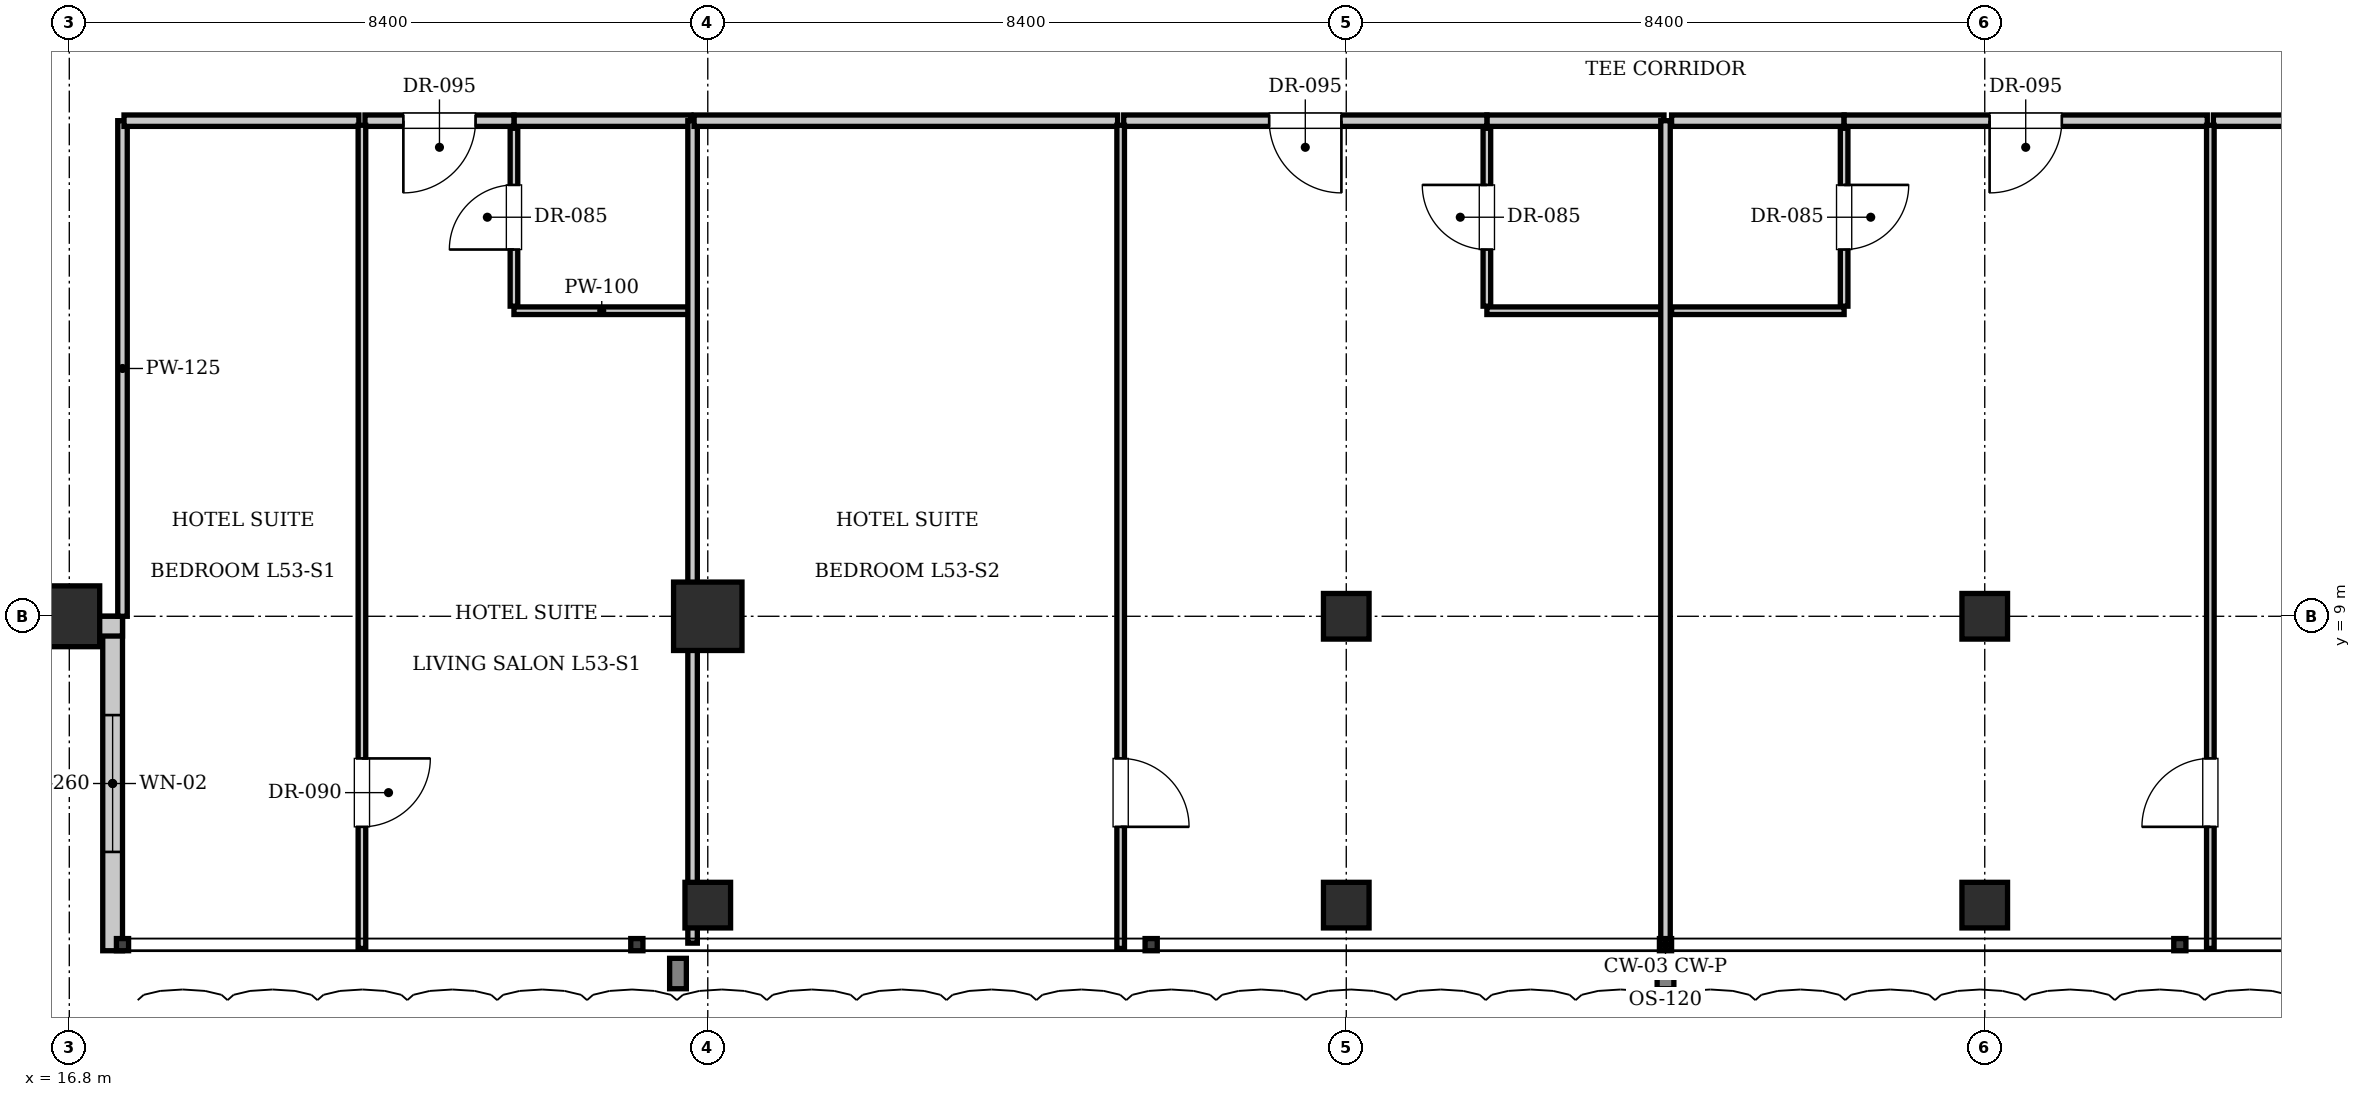
"""IFC4 building model, lengths in metres.
Left out: names, types, materials, properties, quantities, classifications, styles, units other than length and angle.
Written with IfcOpenShell. Run it as: python <this file> out.ifc"""

import sys

from ifc_helpers import new_model, si_unit, direction, frame, frame_2d, origin, origin_2d, place, context, subcontext, project, spatial, rectangle, i_section, extrude, element, fill, save


model = new_model("IFC4")
c1 = context("Model", 3, precision=1e-05, world=origin(), true_north=direction((0.0, 1.0)))
c2 = subcontext(c1, "Body", "Model", "MODEL_VIEW")
j1 = project(units=[si_unit("LENGTHUNIT", "METRE"), si_unit("PLANEANGLEUNIT", "RADIAN")], contexts=[c1])
p1 = place(None, origin())
s1 = spatial("IfcSite", under=j1, at=p1, CompositionType="ELEMENT")
p2 = place(p1, origin())
s2 = spatial("IfcBuilding", under=s1, at=p2, CompositionType="ELEMENT")
p3 = place(p2, frame((0.0, 0.0, 215.95)))
s3 = spatial("IfcBuildingStorey", under=s2, at=p3, CompositionType="ELEMENT", Elevation=215.95)
p4 = place(p3, frame((25.2, 9.0, 0.0), z_axis=(0.0, 0.0, 1.0), x_axis=(1.0, 0.0, 0.0)))
e1 = element("IfcColumn", 1, at=p4, inside=s3, PredefinedType="COLUMN", context=c2, shape_type="SweptSolid", body=[
    extrude(rectangle(XDim=0.9, YDim=0.9, at=origin_2d()), origin(), (0.0, 0.0, 1.0), 3.85),
])
for number, where, z_axis, x_axis in (
    (2, (33.6, 9.0, 0.0), (0.0, 0.0, 1.0), (1.0, 0.0, 0.0)),
    (3, (42.0, 9.0, 0.0), (0.0, 0.0, 1.0), (1.0, 0.0, 0.0)),
):
    element("IfcColumn", number, at=place(p3, frame(where, z_axis=z_axis, x_axis=x_axis)), inside=s3, PredefinedType="COLUMN", context=c2, shape_type="SweptSolid", body=[
        extrude(i_section(OverallWidth=0.6, OverallDepth=0.6, WebThickness=0.025, FlangeThickness=0.038, at=origin_2d()), origin(), (0.0, 0.0, 1.0), 3.85),
    ])
p5 = place(p3, frame((16.8, 9.0, 0.0), z_axis=(0.0, 0.0, 1.0), x_axis=(1.0, 0.0, 0.0)))
e4 = element("IfcColumn", 4, at=p5, inside=s3, PredefinedType="COLUMN", context=c2, shape_type="SweptSolid", body=[
    extrude(rectangle(XDim=0.8, YDim=0.8, at=origin_2d()), origin(), (0.0, 0.0, 1.0), 3.85),
])
for number, where, z_axis, x_axis in (
    (5, (25.2, 5.2, 0.0), (0.0, 0.0, 1.0), (1.0, 0.0, 0.0)),
    (6, (33.6, 5.2, 0.0), (0.0, 0.0, 1.0), (1.0, 0.0, 0.0)),
    (7, (42.0, 5.2, 0.0), (0.0, 0.0, 1.0), (1.0, 0.0, 0.0)),
):
    element("IfcColumn", number, at=place(p3, frame(where, z_axis=z_axis, x_axis=x_axis)), inside=s3, PredefinedType="COLUMN", context=c2, shape_type="SweptSolid", body=[
        extrude(i_section(OverallWidth=0.6, OverallDepth=0.6, WebThickness=0.025, FlangeThickness=0.038, at=origin_2d()), origin(), (0.0, 0.0, 1.0), 3.85),
    ])
p6 = place(p3, frame((17.37, 4.6, 0.0), z_axis=(0.0, 0.0, 1.0), x_axis=(0.0, 1.0, 0.0)))
e8 = element("IfcWall", 8, at=p6, inside=s3, PredefinedType="SOLIDWALL", context=c2, shape_type="SweptSolid", body=[
    extrude(rectangle(XDim=4.4, YDim=0.26, at=frame_2d((2.2, 0.0))), origin(), (0.0, 0.0, 1.0), 3.61),
])
p7 = place(p6, frame((1.3, 0.0, 0.9)))
e9 = element("IfcOpeningElement", 9, at=p7, cuts=e8, PredefinedType="OPENING", context=c2, shape_type="SweptSolid", body=[
    extrude(rectangle(XDim=1.8, YDim=2.1, at=frame_2d((0.9, 1.05))), frame((0.0, 0.14, 0.0), z_axis=(0.0, -1.0, 0.0), x_axis=(1.0, 0.0, 0.0)), (0.0, 0.0, 1.0), 0.28),
])
p8 = place(p3, frame((17.5, 8.87, 0.0), z_axis=(0.0, 0.0, 1.0), x_axis=(-1.0, 0.0, 0.0)))
e10 = element("IfcWall", 10, at=p8, inside=s3, PredefinedType="SOLIDWALL", context=c2, shape_type="SweptSolid", body=[
    extrude(rectangle(XDim=4.4, YDim=0.26, at=frame_2d((2.2, 0.0))), origin(), (0.0, 0.0, 1.0), 3.071),
])
p9 = place(p8, frame((1.3, 0.0, 0.9)))
e11 = element("IfcOpeningElement", 11, at=p9, cuts=e10, PredefinedType="OPENING", context=c2, shape_type="SweptSolid", body=[
    extrude(rectangle(XDim=1.8, YDim=2.1, at=frame_2d((0.9, 1.05))), frame((0.0, 0.14, 0.0), z_axis=(0.0, -1.0, 0.0), x_axis=(1.0, 0.0, 0.0)), (0.0, 0.0, 1.0), 0.28),
])
p10 = place(p3, frame((17.5, 9.0, 0.0), z_axis=(0.0, 0.0, 1.0), x_axis=(0.0, 1.0, 0.0)))
e12 = element("IfcWall", 12, at=p10, inside=s3, PredefinedType="PARTITIONING", context=c2, shape_type="SweptSolid", body=[
    extrude(rectangle(XDim=6.52, YDim=0.125, at=frame_2d((3.26, 0.0))), origin(), (0.0, 0.0, 1.0), 3.61),
])
p11 = place(p3, frame((22.65, 15.52, 0.0), z_axis=(0.0, 0.0, 1.0), x_axis=(1.0, 0.0, 0.0)))
e13 = element("IfcWall", 13, at=p11, inside=s3, PredefinedType="PARTITIONING", context=c2, shape_type="SweptSolid", body=[
    extrude(rectangle(XDim=2.33, YDim=0.15, at=frame_2d((1.165, 0.0))), origin(), (0.0, 0.0, 1.0), 3.61),
])
p12 = place(p3, frame((22.65, 13.02, 0.0), z_axis=(0.0, 0.0, 1.0), x_axis=(1.0, 0.0, 0.0)))
e14 = element("IfcWall", 14, at=p12, inside=s3, PredefinedType="PARTITIONING", context=c2, shape_type="SweptSolid", body=[
    extrude(rectangle(XDim=2.31, YDim=0.1, at=frame_2d((1.155, 0.0))), origin(), (0.0, 0.0, 1.0), 3.61),
])
p13 = place(p3, frame((22.65, 13.08, 0.0), z_axis=(0.0, 0.0, 1.0), x_axis=(0.0, 1.0, 0.0)))
e15 = element("IfcWall", 15, at=p13, inside=s3, PredefinedType="PARTITIONING", context=c2, shape_type="SweptSolid", body=[
    extrude(rectangle(XDim=2.34, YDim=0.1, at=frame_2d((1.17, 0.0))), origin(), (0.0, 0.0, 1.0), 3.61),
])
p14 = place(p13, frame((0.745, 0.0, 0.0)))
e16 = element("IfcOpeningElement", 16, at=p14, cuts=e15, PredefinedType="OPENING", context=c2, shape_type="SweptSolid", body=[
    extrude(rectangle(XDim=0.85, YDim=2.1, at=frame_2d((0.425, 1.05))), frame((0.0, 0.06, 0.0), z_axis=(0.0, -1.0, 0.0), x_axis=(1.0, 0.0, 0.0)), (0.0, 0.0, 1.0), 0.12),
])
p15 = place(p3, frame((17.52, 15.52, 0.0), z_axis=(0.0, 0.0, 1.0), x_axis=(1.0, 0.0, 0.0)))
e17 = element("IfcWall", 17, at=p15, inside=s3, PredefinedType="PARTITIONING", context=c2, shape_type="SweptSolid", body=[
    extrude(rectangle(XDim=3.09, YDim=0.15, at=frame_2d((1.545, 0.0))), origin(), (0.0, 0.0, 1.0), 3.61),
])
p16 = place(p3, frame((20.69, 15.52, 0.0), z_axis=(0.0, 0.0, 1.0), x_axis=(1.0, 0.0, 0.0)))
e18 = element("IfcWall", 18, at=p16, inside=s3, PredefinedType="PARTITIONING", context=c2, shape_type="SweptSolid", body=[
    extrude(rectangle(XDim=1.96, YDim=0.15, at=frame_2d((0.98, 0.0))), origin(), (0.0, 0.0, 1.0), 3.61),
])
p17 = place(p16, frame((0.505, 0.0, 0.0)))
e19 = element("IfcOpeningElement", 19, at=p17, cuts=e18, PredefinedType="OPENING", context=c2, shape_type="SweptSolid", body=[
    extrude(rectangle(XDim=0.95, YDim=2.15, at=frame_2d((0.475, 1.075))), frame((0.0, 0.085, 0.0), z_axis=(0.0, -1.0, 0.0), x_axis=(1.0, 0.0, 0.0)), (0.0, 0.0, 1.0), 0.17),
])
p18 = place(p3, frame((20.65, 4.63, 0.0), z_axis=(0.0, 0.0, 1.0), x_axis=(0.0, 1.0, 0.0)))
e20 = element("IfcWall", 20, at=p18, inside=s3, PredefinedType="PARTITIONING", context=c2, shape_type="SweptSolid", body=[
    extrude(rectangle(XDim=10.83, YDim=0.1, at=frame_2d((5.415, 0.0))), origin(), (0.0, 0.0, 1.0), 3.61),
])
p19 = place(p18, frame((1.6, 0.0, 0.0)))
e21 = element("IfcOpeningElement", 21, at=p19, cuts=e20, PredefinedType="OPENING", context=c2, shape_type="SweptSolid", body=[
    extrude(rectangle(XDim=0.9, YDim=2.1, at=frame_2d((0.45, 1.05))), frame((0.0, 0.06, 0.0), z_axis=(0.0, -1.0, 0.0), x_axis=(1.0, 0.0, 0.0)), (0.0, 0.0, 1.0), 0.12),
])
p20 = place(p3, frame((25.0, 4.7, 0.0), z_axis=(0.0, 0.0, 1.0), x_axis=(0.0, 1.0, 0.0)))
e22 = element("IfcWall", 22, at=p20, inside=s3, PredefinedType="PARTITIONING", context=c2, shape_type="SweptSolid", body=[
    extrude(rectangle(XDim=10.82, YDim=0.125, at=frame_2d((5.41, 0.0))), origin(), (0.0, 0.0, 1.0), 3.61),
])
p21 = place(p3, frame((35.45, 15.52, 0.0), z_axis=(0.0, 0.0, 1.0), x_axis=(1.0, 0.0, 0.0)))
e23 = element("IfcWall", 23, at=p21, inside=s3, PredefinedType="PARTITIONING", context=c2, shape_type="SweptSolid", body=[
    extrude(rectangle(XDim=2.33, YDim=0.15, at=frame_2d((1.165, 0.0))), origin(), (0.0, 0.0, 1.0), 3.61),
])
p22 = place(p3, frame((35.45, 13.02, 0.0), z_axis=(0.0, 0.0, 1.0), x_axis=(1.0, 0.0, 0.0)))
e24 = element("IfcWall", 24, at=p22, inside=s3, PredefinedType="PARTITIONING", context=c2, shape_type="SweptSolid", body=[
    extrude(rectangle(XDim=2.31, YDim=0.1, at=frame_2d((1.155, 0.0))), origin(), (0.0, 0.0, 1.0), 3.61),
])
p23 = place(p3, frame((35.45, 13.08, 0.0), z_axis=(0.0, 0.0, 1.0), x_axis=(0.0, 1.0, 0.0)))
e25 = element("IfcWall", 25, at=p23, inside=s3, PredefinedType="PARTITIONING", context=c2, shape_type="SweptSolid", body=[
    extrude(rectangle(XDim=2.34, YDim=0.1, at=frame_2d((1.17, 0.0))), origin(), (0.0, 0.0, 1.0), 3.61),
])
p24 = place(p23, frame((0.745, 0.0, 0.0)))
e26 = element("IfcOpeningElement", 26, at=p24, cuts=e25, PredefinedType="OPENING", context=c2, shape_type="SweptSolid", body=[
    extrude(rectangle(XDim=0.85, YDim=2.1, at=frame_2d((0.425, 1.05))), frame((0.0, 0.06, 0.0), z_axis=(0.0, -1.0, 0.0), x_axis=(1.0, 0.0, 0.0)), (0.0, 0.0, 1.0), 0.12),
])
p25 = place(p3, frame((25.02, 15.52, 0.0), z_axis=(0.0, 0.0, 1.0), x_axis=(1.0, 0.0, 0.0)))
e27 = element("IfcWall", 27, at=p25, inside=s3, PredefinedType="PARTITIONING", context=c2, shape_type="SweptSolid", body=[
    extrude(rectangle(XDim=5.572, YDim=0.15, at=frame_2d((2.786, 0.0))), origin(), (0.0, 0.0, 1.0), 3.61),
])
p26 = place(p3, frame((30.672, 15.52, 0.0), z_axis=(0.0, 0.0, 1.0), x_axis=(1.0, 0.0, 0.0)))
e28 = element("IfcWall", 28, at=p26, inside=s3, PredefinedType="PARTITIONING", context=c2, shape_type="SweptSolid", body=[
    extrude(rectangle(XDim=4.778, YDim=0.15, at=frame_2d((2.389, 0.0))), origin(), (0.0, 0.0, 1.0), 3.61),
])
p27 = place(p26, frame((1.914, 0.0, 0.0)))
e29 = element("IfcOpeningElement", 29, at=p27, cuts=e28, PredefinedType="OPENING", context=c2, shape_type="SweptSolid", body=[
    extrude(rectangle(XDim=0.95, YDim=2.15, at=frame_2d((0.475, 1.075))), frame((0.0, 0.085, 0.0), z_axis=(0.0, -1.0, 0.0), x_axis=(1.0, 0.0, 0.0)), (0.0, 0.0, 1.0), 0.17),
])
p28 = place(p3, frame((30.632, 4.63, 0.0), z_axis=(0.0, 0.0, 1.0), x_axis=(0.0, 1.0, 0.0)))
e30 = element("IfcWall", 30, at=p28, inside=s3, PredefinedType="PARTITIONING", context=c2, shape_type="SweptSolid", body=[
    extrude(rectangle(XDim=10.83, YDim=0.1, at=frame_2d((5.415, 0.0))), origin(), (0.0, 0.0, 1.0), 3.61),
])
p29 = place(p28, frame((1.6, 0.0, 0.0)))
e31 = element("IfcOpeningElement", 31, at=p29, cuts=e30, PredefinedType="OPENING", context=c2, shape_type="SweptSolid", body=[
    extrude(rectangle(XDim=0.9, YDim=2.1, at=frame_2d((0.45, 1.05))), frame((0.0, 0.06, 0.0), z_axis=(0.0, -1.0, 0.0), x_axis=(1.0, 0.0, 0.0)), (0.0, 0.0, 1.0), 0.12),
])
p30 = place(p3, frame((37.8, 4.7, 0.0), z_axis=(0.0, 0.0, 1.0), x_axis=(0.0, 1.0, 0.0)))
e32 = element("IfcWall", 32, at=p30, inside=s3, PredefinedType="PARTITIONING", context=c2, shape_type="SweptSolid", body=[
    extrude(rectangle(XDim=10.82, YDim=0.125, at=frame_2d((5.41, 0.0))), origin(), (0.0, 0.0, 1.0), 3.255),
])
p31 = place(p3, frame((37.88, 15.52, 0.0), z_axis=(0.0, 0.0, 1.0), x_axis=(1.0, 0.0, 0.0)))
e33 = element("IfcWall", 33, at=p31, inside=s3, PredefinedType="PARTITIONING", context=c2, shape_type="SweptSolid", body=[
    extrude(rectangle(XDim=2.27, YDim=0.15, at=frame_2d((1.135, 0.0))), origin(), (0.0, 0.0, 1.0), 3.61),
])
p32 = place(p3, frame((37.88, 13.02, 0.0), z_axis=(0.0, 0.0, 1.0), x_axis=(1.0, 0.0, 0.0)))
e34 = element("IfcWall", 34, at=p32, inside=s3, PredefinedType="PARTITIONING", context=c2, shape_type="SweptSolid", body=[
    extrude(rectangle(XDim=2.27, YDim=0.1, at=frame_2d((1.135, 0.0))), origin(), (0.0, 0.0, 1.0), 3.61),
])
p33 = place(p3, frame((40.15, 13.08, 0.0), z_axis=(0.0, 0.0, 1.0), x_axis=(0.0, 1.0, 0.0)))
e35 = element("IfcWall", 35, at=p33, inside=s3, PredefinedType="PARTITIONING", context=c2, shape_type="SweptSolid", body=[
    extrude(rectangle(XDim=2.34, YDim=0.1, at=frame_2d((1.17, 0.0))), origin(), (0.0, 0.0, 1.0), 3.61),
])
p34 = place(p33, frame((0.745, 0.0, 0.0)))
e36 = element("IfcOpeningElement", 36, at=p34, cuts=e35, PredefinedType="OPENING", context=c2, shape_type="SweptSolid", body=[
    extrude(rectangle(XDim=0.85, YDim=2.1, at=frame_2d((0.425, 1.05))), frame((0.0, 0.06, 0.0), z_axis=(0.0, -1.0, 0.0), x_axis=(1.0, 0.0, 0.0)), (0.0, 0.0, 1.0), 0.12),
])
p35 = place(p3, frame((40.15, 15.52, 0.0), z_axis=(0.0, 0.0, 1.0), x_axis=(1.0, 0.0, 0.0)))
e37 = element("IfcWall", 37, at=p35, inside=s3, PredefinedType="PARTITIONING", context=c2, shape_type="SweptSolid", body=[
    extrude(rectangle(XDim=4.778, YDim=0.15, at=frame_2d((2.389, 0.0))), origin(), (0.0, 0.0, 1.0), 3.61),
])
p36 = place(p35, frame((1.914, 0.0, 0.0)))
e38 = element("IfcOpeningElement", 38, at=p36, cuts=e37, PredefinedType="OPENING", context=c2, shape_type="SweptSolid", body=[
    extrude(rectangle(XDim=0.95, YDim=2.15, at=frame_2d((0.475, 1.075))), frame((0.0, 0.085, 0.0), z_axis=(0.0, -1.0, 0.0), x_axis=(1.0, 0.0, 0.0)), (0.0, 0.0, 1.0), 0.17),
])
p37 = place(p3, frame((45.008, 15.52, 0.0), z_axis=(0.0, 0.0, 1.0), x_axis=(1.0, 0.0, 0.0)))
e39 = element("IfcWall", 39, at=p37, inside=s3, PredefinedType="PARTITIONING", context=c2, shape_type="SweptSolid", body=[
    extrude(rectangle(XDim=5.572, YDim=0.15, at=frame_2d((2.786, 0.0))), origin(), (0.0, 0.0, 1.0), 3.61),
])
p38 = place(p3, frame((44.968, 4.63, 0.0), z_axis=(0.0, 0.0, 1.0), x_axis=(0.0, 1.0, 0.0)))
e40 = element("IfcWall", 40, at=p38, inside=s3, PredefinedType="PARTITIONING", context=c2, shape_type="SweptSolid", body=[
    extrude(rectangle(XDim=10.83, YDim=0.1, at=frame_2d((5.415, 0.0))), origin(), (0.0, 0.0, 1.0), 3.61),
])
p39 = place(p38, frame((1.6, 0.0, 0.0)))
e41 = element("IfcOpeningElement", 41, at=p39, cuts=e40, PredefinedType="OPENING", context=c2, shape_type="SweptSolid", body=[
    extrude(rectangle(XDim=0.9, YDim=2.1, at=frame_2d((0.45, 1.05))), frame((0.0, 0.06, 0.0), z_axis=(0.0, -1.0, 0.0), x_axis=(1.0, 0.0, 0.0)), (0.0, 0.0, 1.0), 0.12),
])
p40 = place(p7, origin())
e42 = element("IfcWindow", 42, at=p40, inside=s3, PartitioningType="SINGLE_PANEL", PredefinedType="WINDOW", context=c2, shape_type="SweptSolid", body=[
    extrude(rectangle(XDim=1.8, YDim=2.1, at=frame_2d((0.9, 1.05))), frame((0.0, 0.03, 0.0), z_axis=(0.0, -1.0, 0.0), x_axis=(1.0, 0.0, 0.0)), (0.0, 0.0, 1.0), 0.06),
])
fill(e9, e42)
p41 = place(p14, origin())
e43 = element("IfcDoor", 43, at=p41, inside=s3, OperationType="SINGLE_SWING_LEFT", PredefinedType="DOOR", context=c2, shape_type="SweptSolid", body=[
    extrude(rectangle(XDim=0.85, YDim=2.1, at=frame_2d((0.425, 1.05))), frame((0.0, 0.025, 0.0), z_axis=(0.0, -1.0, 0.0), x_axis=(1.0, 0.0, 0.0)), (0.0, 0.0, 1.0), 0.05),
])
fill(e16, e43)
p42 = place(p17, frame((0.95, 0.0, 0.0), z_axis=(0.0, 0.0, 1.0), x_axis=(-1.0, 0.0, 0.0)))
e44 = element("IfcDoor", 44, at=p42, inside=s3, OperationType="SINGLE_SWING_RIGHT", PredefinedType="DOOR", context=c2, shape_type="SweptSolid", body=[
    extrude(rectangle(XDim=0.95, YDim=2.15, at=frame_2d((0.475, 1.075))), frame((0.0, 0.025, 0.0), z_axis=(0.0, -1.0, 0.0), x_axis=(1.0, 0.0, 0.0)), (0.0, 0.0, 1.0), 0.05),
])
fill(e19, e44)
p43 = place(p19, frame((0.9, 0.0, 0.0), z_axis=(0.0, 0.0, 1.0), x_axis=(-1.0, 0.0, 0.0)))
e45 = element("IfcDoor", 45, at=p43, inside=s3, OperationType="SINGLE_SWING_LEFT", PredefinedType="DOOR", context=c2, shape_type="SweptSolid", body=[
    extrude(rectangle(XDim=0.9, YDim=2.1, at=frame_2d((0.45, 1.05))), frame((0.0, 0.025, 0.0), z_axis=(0.0, -1.0, 0.0), x_axis=(1.0, 0.0, 0.0)), (0.0, 0.0, 1.0), 0.05),
])
fill(e21, e45)
p44 = place(p24, origin())
e46 = element("IfcDoor", 46, at=p44, inside=s3, OperationType="SINGLE_SWING_RIGHT", PredefinedType="DOOR", context=c2, shape_type="SweptSolid", body=[
    extrude(rectangle(XDim=0.85, YDim=2.1, at=frame_2d((0.425, 1.05))), frame((0.0, 0.025, 0.0), z_axis=(0.0, -1.0, 0.0), x_axis=(1.0, 0.0, 0.0)), (0.0, 0.0, 1.0), 0.05),
])
fill(e26, e46)
p45 = place(p27, frame((0.95, 0.0, 0.0), z_axis=(0.0, 0.0, 1.0), x_axis=(-1.0, 0.0, 0.0)))
e47 = element("IfcDoor", 47, at=p45, inside=s3, OperationType="SINGLE_SWING_LEFT", PredefinedType="DOOR", context=c2, shape_type="SweptSolid", body=[
    extrude(rectangle(XDim=0.95, YDim=2.15, at=frame_2d((0.475, 1.075))), frame((0.0, 0.025, 0.0), z_axis=(0.0, -1.0, 0.0), x_axis=(1.0, 0.0, 0.0)), (0.0, 0.0, 1.0), 0.05),
])
fill(e29, e47)
p46 = place(p29, frame((0.9, 0.0, 0.0), z_axis=(0.0, 0.0, 1.0), x_axis=(-1.0, 0.0, 0.0)))
e48 = element("IfcDoor", 48, at=p46, inside=s3, OperationType="SINGLE_SWING_RIGHT", PredefinedType="DOOR", context=c2, shape_type="SweptSolid", body=[
    extrude(rectangle(XDim=0.9, YDim=2.1, at=frame_2d((0.45, 1.05))), frame((0.0, 0.025, 0.0), z_axis=(0.0, -1.0, 0.0), x_axis=(1.0, 0.0, 0.0)), (0.0, 0.0, 1.0), 0.05),
])
fill(e31, e48)
p47 = place(p34, frame((0.85, 0.0, 0.0), z_axis=(0.0, 0.0, 1.0), x_axis=(-1.0, 0.0, 0.0)))
e49 = element("IfcDoor", 49, at=p47, inside=s3, OperationType="SINGLE_SWING_LEFT", PredefinedType="DOOR", context=c2, shape_type="SweptSolid", body=[
    extrude(rectangle(XDim=0.85, YDim=2.1, at=frame_2d((0.425, 1.05))), frame((0.0, 0.025, 0.0), z_axis=(0.0, -1.0, 0.0), x_axis=(1.0, 0.0, 0.0)), (0.0, 0.0, 1.0), 0.05),
])
fill(e36, e49)
p48 = place(p36, frame((0.95, 0.0, 0.0), z_axis=(0.0, 0.0, 1.0), x_axis=(-1.0, 0.0, 0.0)))
e50 = element("IfcDoor", 50, at=p48, inside=s3, OperationType="SINGLE_SWING_RIGHT", PredefinedType="DOOR", context=c2, shape_type="SweptSolid", body=[
    extrude(rectangle(XDim=0.95, YDim=2.15, at=frame_2d((0.475, 1.075))), frame((0.0, 0.025, 0.0), z_axis=(0.0, -1.0, 0.0), x_axis=(1.0, 0.0, 0.0)), (0.0, 0.0, 1.0), 0.05),
])
fill(e38, e50)
p49 = place(p39, origin())
e51 = element("IfcDoor", 51, at=p49, inside=s3, OperationType="SINGLE_SWING_LEFT", PredefinedType="DOOR", context=c2, shape_type="SweptSolid", body=[
    extrude(rectangle(XDim=0.9, YDim=2.1, at=frame_2d((0.45, 1.05))), frame((0.0, 0.025, 0.0), z_axis=(0.0, -1.0, 0.0), x_axis=(1.0, 0.0, 0.0)), (0.0, 0.0, 1.0), 0.05),
])
fill(e41, e51)
save(model, sys.argv[1])
